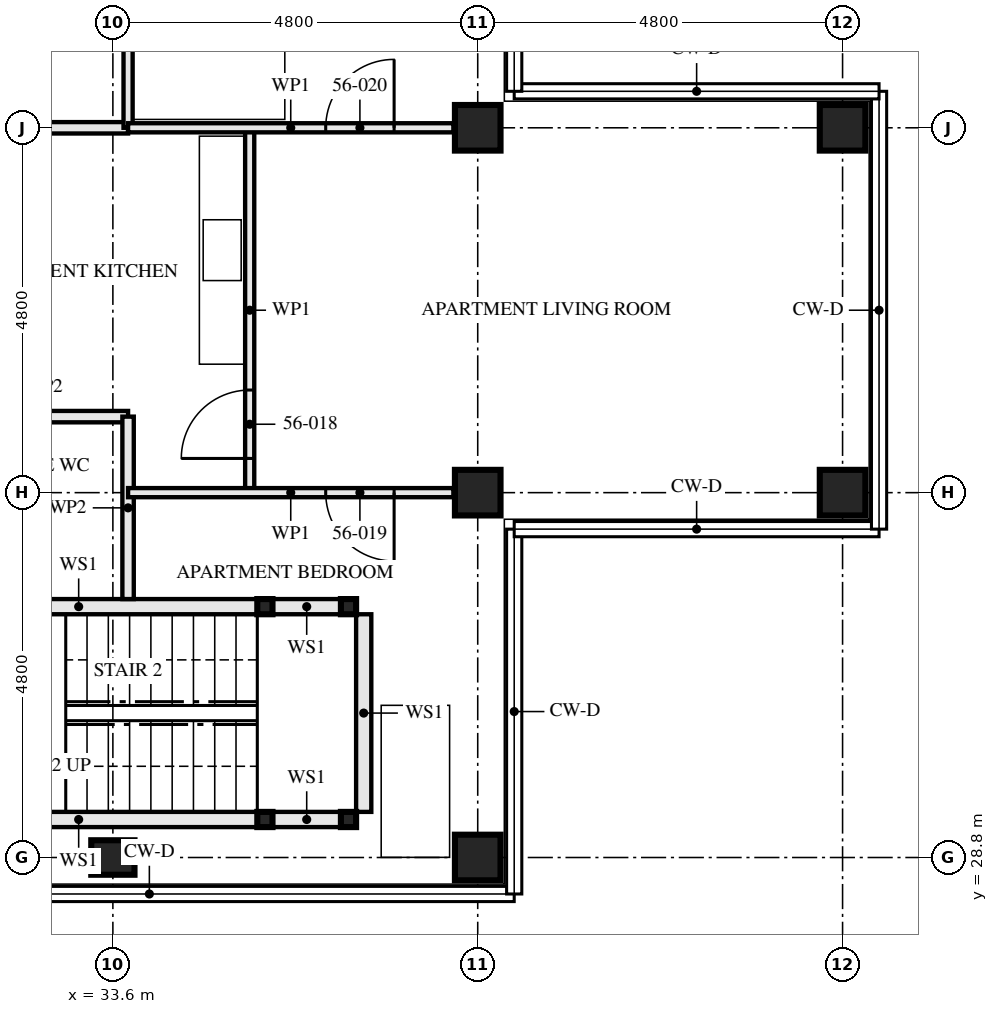
"""IFC4 building model, lengths in metres.
Left out: names, types, materials, properties, quantities, classifications, styles, units other than length and angle.
Written with IfcOpenShell. Run it as: python <this file> out.ifc"""

import sys

from ifc_helpers import new_model, si_unit, direction, frame, frame_2d, origin, origin_2d, place, context, subcontext, project, spatial, rectangle, hollow_rectangle, i_section, extrude, element, fill, save


model = new_model("IFC4")
c1 = context("Model", 3, precision=1e-05, world=origin(), true_north=direction((0.0, 1.0)))
c2 = subcontext(c1, "Body", "Model", "MODEL_VIEW")
j1 = project(units=[si_unit("LENGTHUNIT", "METRE"), si_unit("PLANEANGLEUNIT", "RADIAN")], contexts=[c1])
p1 = place(None, origin())
s1 = spatial("IfcSite", under=j1, at=p1, CompositionType="ELEMENT")
p2 = place(p1, origin())
s2 = spatial("IfcBuilding", under=s1, at=p2, CompositionType="ELEMENT")
p3 = place(p2, frame((0.0, 0.0, 205.0)))
s3 = spatial("IfcBuildingStorey", under=s2, at=p3, CompositionType="ELEMENT", Elevation=205.0)
p4 = place(p3, frame((33.6, 28.8, 0.0), z_axis=(0.0, 0.0, 1.0), x_axis=(0.0, 1.0, 0.0)))
e1 = element("IfcColumn", 1, at=p4, inside=s3, PredefinedType="COLUMN", context=c2, shape_type="SweptSolid", body=[
    extrude(i_section(OverallWidth=0.454, OverallDepth=0.569, WebThickness=0.078, FlangeThickness=0.125, FilletRadius=0.015, at=origin_2d()), origin(), (0.0, 0.0, 1.0), 3.5),
])
for number, where, z_axis, x_axis in (
    (2, (38.4, 28.8, 0.0), (0.0, 0.0, 1.0), (0.0, 1.0, 0.0)),
    (3, (38.4, 33.6, 0.0), (0.0, 0.0, 1.0), (0.0, 1.0, 0.0)),
    (4, (38.4, 38.4, 0.0), (0.0, 0.0, 1.0), (0.0, 1.0, 0.0)),
    (5, (43.2, 33.6, 0.0), (0.0, 0.0, 1.0), (0.0, 1.0, 0.0)),
    (6, (43.2, 38.4, 0.0), (0.0, 0.0, 1.0), (0.0, 1.0, 0.0)),
):
    element("IfcColumn", number, at=place(p3, frame(where, z_axis=z_axis, x_axis=x_axis)), inside=s3, PredefinedType="COLUMN", context=c2, shape_type="SweptSolid", body=[
        extrude(hollow_rectangle(XDim=0.6, YDim=0.6, WallThickness=0.05, at=origin_2d()), origin(), (0.0, 0.0, 1.0), 3.5),
    ])
for number, where, z_axis, x_axis in (
    (7, (36.7, 29.3, 0.0), (0.0, 0.0, 1.0), (1.0, 0.0, 0.0)),
    (8, (36.7, 32.1, 0.0), (0.0, 0.0, 1.0), (1.0, 0.0, 0.0)),
    (9, (35.6, 29.3, 0.0), (0.0, 0.0, 1.0), (1.0, 0.0, 0.0)),
    (10, (35.6, 32.1, 0.0), (0.0, 0.0, 1.0), (1.0, 0.0, 0.0)),
):
    element("IfcColumn", number, at=place(p3, frame(where, z_axis=z_axis, x_axis=x_axis)), inside=s3, PredefinedType="COLUMN", context=c2, shape_type="SweptSolid", body=[
        extrude(hollow_rectangle(XDim=0.2, YDim=0.2, WallThickness=0.008, at=origin_2d()), origin(), (0.0, 0.0, 1.0), 3.33),
    ])
p5 = place(p3, frame((36.6, 29.3, 0.0), z_axis=(0.0, 0.0, 1.0), x_axis=(-1.0, 0.0, 0.0)))
e11 = element("IfcWall", 11, at=p5, inside=s3, PredefinedType="SOLIDWALL", context=c2, shape_type="SweptSolid", body=[
    extrude(rectangle(XDim=0.9, YDim=0.2, at=frame_2d((0.45, 0.0))), origin(), (0.0, 0.0, 1.0), 2.99),
])
p6 = place(p3, frame((35.5, 29.3, 0.0), z_axis=(0.0, 0.0, 1.0), x_axis=(-1.0, 0.0, 0.0)))
e12 = element("IfcWall", 12, at=p6, inside=s3, PredefinedType="SOLIDWALL", context=c2, shape_type="SweptSolid", body=[
    extrude(rectangle(XDim=4.7, YDim=0.2, at=frame_2d((2.35, 0.0))), origin(), (0.0, 0.0, 1.0), 2.99),
])
p7 = place(p3, frame((36.6, 32.1, 0.0), z_axis=(0.0, 0.0, 1.0), x_axis=(-1.0, 0.0, 0.0)))
e13 = element("IfcWall", 13, at=p7, inside=s3, PredefinedType="SOLIDWALL", context=c2, shape_type="SweptSolid", body=[
    extrude(rectangle(XDim=0.9, YDim=0.2, at=frame_2d((0.45, 0.0))), origin(), (0.0, 0.0, 1.0), 2.99),
])
p8 = place(p3, frame((35.5, 32.1, 0.0), z_axis=(0.0, 0.0, 1.0), x_axis=(-1.0, 0.0, 0.0)))
e14 = element("IfcWall", 14, at=p8, inside=s3, PredefinedType="SOLIDWALL", context=c2, shape_type="SweptSolid", body=[
    extrude(rectangle(XDim=4.7, YDim=0.2, at=frame_2d((2.35, 0.0))), origin(), (0.0, 0.0, 1.0), 2.99),
])
p9 = place(p3, frame((36.9, 29.4, 0.0), z_axis=(0.0, 0.0, 1.0), x_axis=(0.0, 1.0, 0.0)))
e15 = element("IfcWall", 15, at=p9, inside=s3, PredefinedType="SOLIDWALL", context=c2, shape_type="SweptSolid", body=[
    extrude(rectangle(XDim=2.6, YDim=0.2, at=frame_2d((1.3, 0.0))), origin(), (0.0, 0.0, 1.0), 3.33),
])
p10 = place(p3, frame((33.8, 32.2, 0.0), z_axis=(0.0, 0.0, 1.0), x_axis=(0.0, 1.0, 0.0)))
e16 = element("IfcWall", 16, at=p10, inside=s3, PredefinedType="PARTITIONING", context=c2, shape_type="SweptSolid", body=[
    extrude(rectangle(XDim=2.4, YDim=0.15, at=frame_2d((1.2, 0.0))), origin(), (0.0, 0.0, 1.0), 2.55),
])
p11 = place(p3, frame((33.8, 34.6, 0.0), z_axis=(0.0, 0.0, 1.0), x_axis=(-1.0, 0.0, 0.0)))
e17 = element("IfcWall", 17, at=p11, inside=s3, PredefinedType="PARTITIONING", context=c2, shape_type="SweptSolid", body=[
    extrude(rectangle(XDim=3.0, YDim=0.15, at=frame_2d((1.5, 0.0))), origin(), (0.0, 0.0, 1.0), 3.33),
])
p12 = place(p3, frame((33.8, 38.4, 0.0), z_axis=(0.0, 0.0, 1.0), x_axis=(-1.0, 0.0, 0.0)))
e18 = element("IfcWall", 18, at=p12, inside=s3, PredefinedType="PARTITIONING", context=c2, shape_type="SweptSolid", body=[
    extrude(rectangle(XDim=3.0, YDim=0.15, at=frame_2d((1.5, 0.0))), origin(), (0.0, 0.0, 1.0), 2.55),
])
p13 = place(p12, frame((1.05, 0.0, 0.0)))
e19 = element("IfcOpeningElement", 19, at=p13, cuts=e18, PredefinedType="OPENING", context=c2, shape_type="SweptSolid", body=[
    extrude(rectangle(XDim=0.9, YDim=2.1, at=frame_2d((0.45, 1.05))), frame((0.0, 0.085, 0.0), z_axis=(0.0, -1.0, 0.0), x_axis=(1.0, 0.0, 0.0)), (0.0, 0.0, 1.0), 0.171),
])
p14 = place(p3, frame((35.4, 33.6, 0.0), z_axis=(0.0, 0.0, 1.0), x_axis=(0.0, 1.0, 0.0)))
e20 = element("IfcWall", 20, at=p14, inside=s3, PredefinedType="PARTITIONING", context=c2, shape_type="SweptSolid", body=[
    extrude(rectangle(XDim=4.8, YDim=0.12, at=frame_2d((2.4, 0.0))), origin(), (0.0, 0.0, 1.0), 3.33),
])
p15 = place(p14, frame((0.45, 0.0, 0.0)))
e21 = element("IfcOpeningElement", 21, at=p15, cuts=e20, PredefinedType="OPENING", context=c2, shape_type="SweptSolid", body=[
    extrude(rectangle(XDim=0.9, YDim=2.1, at=frame_2d((0.45, 1.05))), frame((0.0, 0.071, 0.0), z_axis=(0.0, -1.0, 0.0), x_axis=(1.0, 0.0, 0.0)), (0.0, 0.0, 1.0), 0.141),
])
p16 = place(p3, frame((33.8, 38.4, 0.0), z_axis=(0.0, 0.0, 1.0), x_axis=(0.0, 1.0, 0.0)))
e22 = element("IfcWall", 22, at=p16, inside=s3, PredefinedType="PARTITIONING", context=c2, shape_type="SweptSolid", body=[
    extrude(rectangle(XDim=4.553, YDim=0.12, at=frame_2d((2.276, 0.0))), origin(), (0.0, 0.0, 1.0), 3.33),
])
p17 = place(p3, frame((38.08, 33.6, 0.0), z_axis=(0.0, 0.0, 1.0), x_axis=(-1.0, 0.0, 0.0)))
e23 = element("IfcWall", 23, at=p17, inside=s3, PredefinedType="PARTITIONING", context=c2, shape_type="SweptSolid", body=[
    extrude(rectangle(XDim=4.28, YDim=0.12, at=frame_2d((2.14, 0.0))), origin(), (0.0, 0.0, 1.0), 2.55),
])
p18 = place(p17, frame((0.78, 0.0, 0.0)))
e24 = element("IfcOpeningElement", 24, at=p18, cuts=e23, PredefinedType="OPENING", context=c2, shape_type="SweptSolid", body=[
    extrude(rectangle(XDim=0.9, YDim=2.1, at=frame_2d((0.45, 1.05))), frame((0.0, 0.071, 0.0), z_axis=(0.0, -1.0, 0.0), x_axis=(1.0, 0.0, 0.0)), (0.0, 0.0, 1.0), 0.141),
])
p19 = place(p3, frame((38.08, 38.4, 0.0), z_axis=(0.0, 0.0, 1.0), x_axis=(-1.0, 0.0, 0.0)))
e25 = element("IfcWall", 25, at=p19, inside=s3, PredefinedType="PARTITIONING", context=c2, shape_type="SweptSolid", body=[
    extrude(rectangle(XDim=4.28, YDim=0.12, at=frame_2d((2.14, 0.0))), origin(), (0.0, 0.0, 1.0), 2.55),
])
p20 = place(p19, frame((0.78, 0.0, 0.0)))
e26 = element("IfcOpeningElement", 26, at=p20, cuts=e25, PredefinedType="OPENING", context=c2, shape_type="SweptSolid", body=[
    extrude(rectangle(XDim=0.9, YDim=2.1, at=frame_2d((0.45, 1.05))), frame((0.0, 0.071, 0.0), z_axis=(0.0, -1.0, 0.0), x_axis=(1.0, 0.0, 0.0)), (0.0, 0.0, 1.0), 0.141),
])
p21 = place(p15, origin())
e27 = element("IfcDoor", 27, at=p21, inside=s3, OperationType="SINGLE_SWING_RIGHT", PredefinedType="DOOR", context=c2, shape_type="SweptSolid", body=[
    extrude(rectangle(XDim=0.9, YDim=2.1, at=frame_2d((0.45, 1.05))), frame((0.0, 0.022, 0.0), z_axis=(0.0, -1.0, 0.0), x_axis=(1.0, 0.0, 0.0)), (0.0, 0.0, 1.0), 0.044),
])
fill(e21, e27)
p22 = place(p18, origin())
e28 = element("IfcDoor", 28, at=p22, inside=s3, OperationType="SINGLE_SWING_RIGHT", PredefinedType="DOOR", context=c2, shape_type="SweptSolid", body=[
    extrude(rectangle(XDim=0.9, YDim=2.1, at=frame_2d((0.45, 1.05))), frame((0.0, 0.022, 0.0), z_axis=(0.0, -1.0, 0.0), x_axis=(1.0, 0.0, 0.0)), (0.0, 0.0, 1.0), 0.044),
])
fill(e24, e28)
p23 = place(p20, frame((0.9, 0.0, 0.0), z_axis=(0.0, 0.0, 1.0), x_axis=(-1.0, 0.0, 0.0)))
e29 = element("IfcDoor", 29, at=p23, inside=s3, OperationType="SINGLE_SWING_LEFT", PredefinedType="DOOR", context=c2, shape_type="SweptSolid", body=[
    extrude(rectangle(XDim=0.9, YDim=2.1, at=frame_2d((0.45, 1.05))), frame((0.0, 0.022, 0.0), z_axis=(0.0, -1.0, 0.0), x_axis=(1.0, 0.0, 0.0)), (0.0, 0.0, 1.0), 0.044),
])
fill(e26, e29)
save(model, sys.argv[1])
